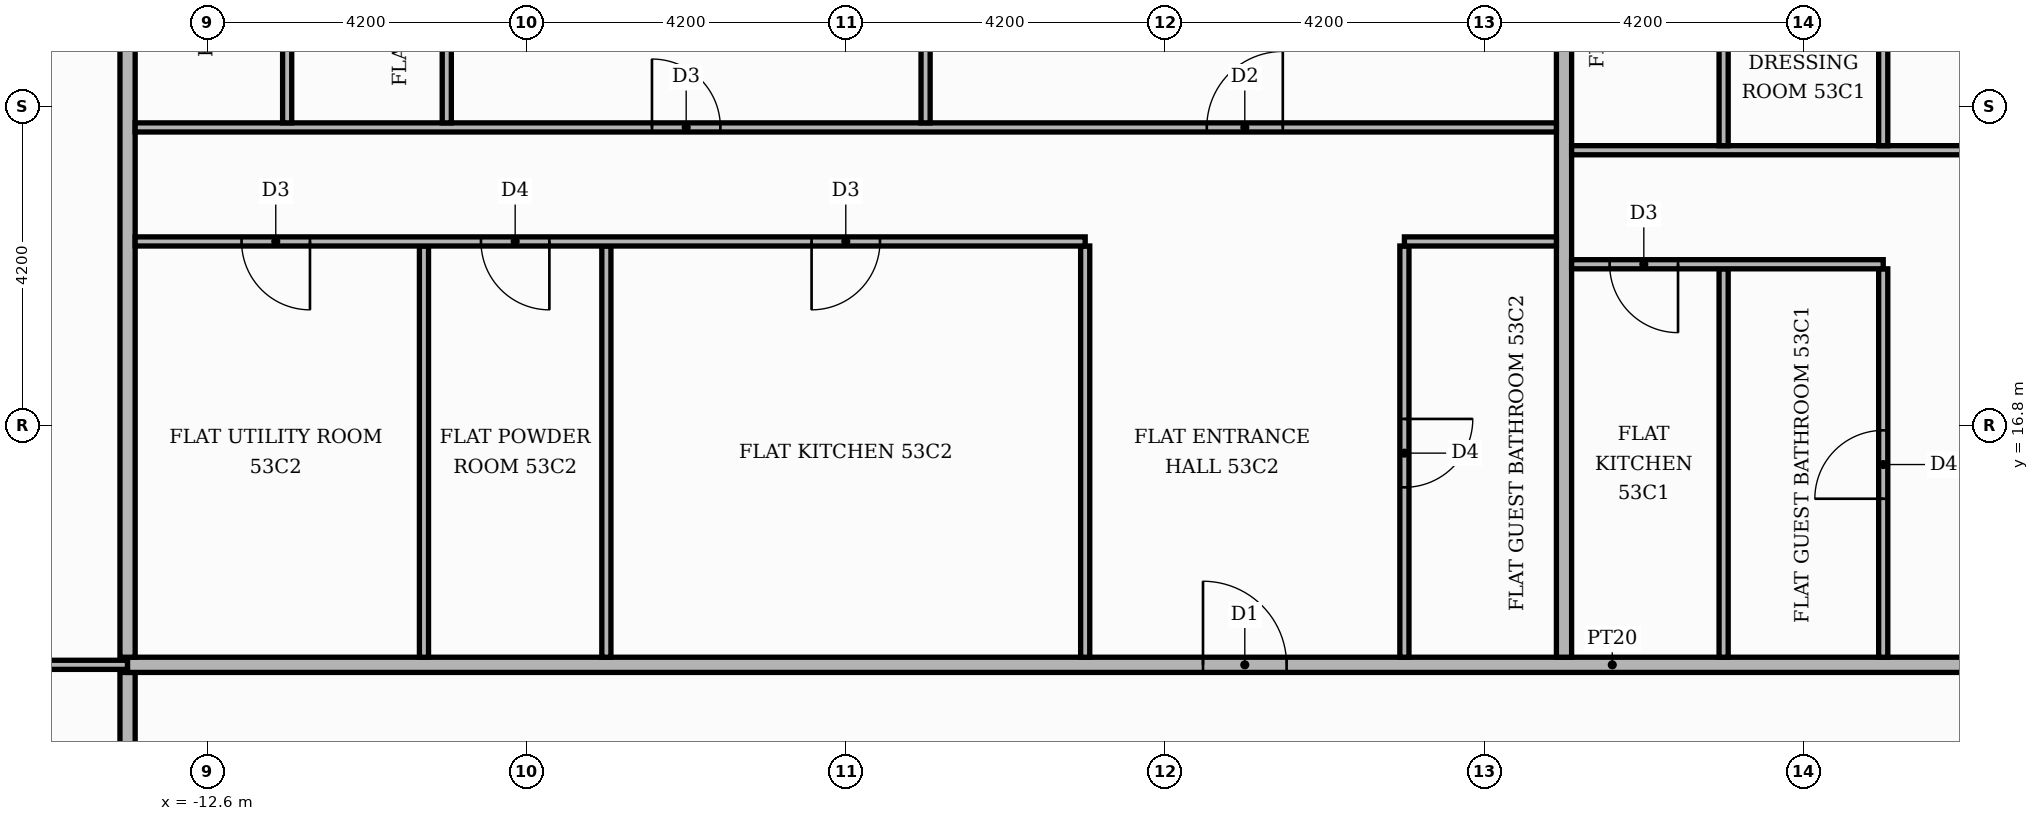
"""IFC4 building model, lengths in metres.
Left out: names, types, materials, properties, quantities, classifications, styles, units other than length and angle.
Written with IfcOpenShell. Run it as: python <this file> out.ifc"""

import sys

from ifc_helpers import new_model, si_unit, direction, frame, frame_2d, origin, place, context, subcontext, project, spatial, rectangle, extrude, element, fill, save


model = new_model("IFC4")
c1 = context("Model", 3, precision=1e-05, world=origin(), true_north=direction((0.0, 1.0)))
c2 = subcontext(c1, "Body", "Model", "MODEL_VIEW")
j1 = project(units=[si_unit("LENGTHUNIT", "METRE"), si_unit("PLANEANGLEUNIT", "RADIAN")], contexts=[c1])
p1 = place(None, origin())
s1 = spatial("IfcSite", under=j1, at=p1, CompositionType="ELEMENT")
p2 = place(p1, origin())
s2 = spatial("IfcBuilding", under=s1, at=p2, CompositionType="ELEMENT")
p3 = place(p2, frame((0.0, 0.0, 223.5)))
s3 = spatial("IfcBuildingStorey", under=s2, at=p3, CompositionType="ELEMENT", Elevation=223.5)
p4 = place(p3, frame((-13.65, -13.55, 0.0), z_axis=(0.0, 0.0, 1.0), x_axis=(0.0, 1.0, 0.0)))
e1 = element("IfcWall", 1, at=p4, inside=s3, PredefinedType="PARTITIONING", context=c2, shape_type="SweptSolid", body=[
    extrude(rectangle(XDim=27.1, YDim=0.2, at=frame_2d((13.55, 0.0))), origin(), (0.0, 0.0, 1.0), 3.48),
])
p5 = place(p4, frame((23.5, 0.0, 0.0)))
e2 = element("IfcOpeningElement", 2, at=p5, cuts=e1, PredefinedType="OPENING", context=c2, shape_type="SweptSolid", body=[
    extrude(rectangle(XDim=1.1, YDim=2.4, at=frame_2d((0.55, 1.2))), frame((0.0, 0.11, 0.0), z_axis=(0.0, -1.0, 0.0), x_axis=(1.0, 0.0, 0.0)), (0.0, 0.0, 1.0), 0.22),
])
p6 = place(p3, frame((-19.82, 13.65, 0.0), z_axis=(0.0, 0.0, 1.0), x_axis=(1.0, 0.0, 0.0)))
e3 = element("IfcWall", 3, at=p6, inside=s3, PredefinedType="PARTITIONING", context=c2, shape_type="SweptSolid", body=[
    extrude(rectangle(XDim=6.17, YDim=0.12, at=frame_2d((3.085, 0.0))), origin(), (0.0, 0.0, 1.0), 3.48),
])
p7 = place(p6, frame((2.635, 0.0, 0.0)))
e4 = element("IfcOpeningElement", 4, at=p7, cuts=e3, PredefinedType="OPENING", context=c2, shape_type="SweptSolid", body=[
    extrude(rectangle(XDim=0.9, YDim=2.1, at=frame_2d((0.45, 1.05))), frame((0.0, 0.07, 0.0), z_axis=(0.0, -1.0, 0.0), x_axis=(1.0, 0.0, 0.0)), (0.0, 0.0, 1.0), 0.14),
])
p8 = place(p3, frame((-13.65, 13.65, 0.0), z_axis=(0.0, 0.0, 1.0), x_axis=(1.0, 0.0, 0.0)))
e5 = element("IfcWall", 5, at=p8, inside=s3, PredefinedType="PARTITIONING", context=c2, shape_type="SweptSolid", body=[
    extrude(rectangle(XDim=39.07, YDim=0.2, at=frame_2d((19.535, 0.0))), origin(), (0.0, 0.0, 1.0), 3.48),
])
p9 = place(p8, frame((24.65, 0.0, 0.0)))
e6 = element("IfcOpeningElement", 6, at=p9, cuts=e5, PredefinedType="OPENING", context=c2, shape_type="SweptSolid", body=[
    extrude(rectangle(XDim=1.1, YDim=2.4, at=frame_2d((0.55, 1.2))), frame((0.0, 0.11, 0.0), z_axis=(0.0, -1.0, 0.0), x_axis=(1.0, 0.0, 0.0)), (0.0, 0.0, 1.0), 0.22),
])
p10 = place(p8, frame((14.15, 0.0, 0.0)))
e7 = element("IfcOpeningElement", 7, at=p10, cuts=e5, PredefinedType="OPENING", context=c2, shape_type="SweptSolid", body=[
    extrude(rectangle(XDim=1.1, YDim=2.4, at=frame_2d((0.55, 1.2))), frame((0.0, 0.11, 0.0), z_axis=(0.0, -1.0, 0.0), x_axis=(1.0, 0.0, 0.0)), (0.0, 0.0, 1.0), 0.22),
])
p11 = place(p3, frame((-13.65, 13.75, 0.0), z_axis=(0.0, 0.0, 1.0), x_axis=(0.0, 1.0, 0.0)))
e8 = element("IfcWall", 8, at=p11, inside=s3, PredefinedType="PARTITIONING", context=c2, shape_type="SweptSolid", body=[
    extrude(rectangle(XDim=11.67, YDim=0.2, at=frame_2d((5.835, 0.0))), origin(), (0.0, 0.0, 1.0), 3.48),
])
for number, where, z_axis, x_axis in (
    (9, (-9.75, 13.75, 0.0), (0.0, 0.0, 1.0), (0.0, 1.0, 0.0)),
    (10, (-7.35, 13.75, 0.0), (0.0, 0.0, 1.0), (0.0, 1.0, 0.0)),
    (11, (-1.05, 13.75, 0.0), (0.0, 0.0, 1.0), (0.0, 1.0, 0.0)),
):
    element("IfcWall", number, at=place(p3, frame(where, z_axis=z_axis, x_axis=x_axis)), inside=s3, PredefinedType="PARTITIONING", context=c2, shape_type="SweptSolid", body=[
        extrude(rectangle(XDim=5.41, YDim=0.12, at=frame_2d((2.705, 0.0))), origin(), (0.0, 0.0, 1.0), 3.48),
    ])
p12 = place(p3, frame((3.15, 13.75, 0.0), z_axis=(0.0, 0.0, 1.0), x_axis=(0.0, 1.0, 0.0)))
e12 = element("IfcWall", 12, at=p12, inside=s3, PredefinedType="PARTITIONING", context=c2, shape_type="SweptSolid", body=[
    extrude(rectangle(XDim=5.41, YDim=0.12, at=frame_2d((2.705, 0.0))), origin(), (0.0, 0.0, 1.0), 3.48),
])
p13 = place(p12, frame((2.235, 0.0, 0.0)))
e13 = element("IfcOpeningElement", 13, at=p13, cuts=e12, PredefinedType="OPENING", context=c2, shape_type="SweptSolid", body=[
    extrude(rectangle(XDim=0.9, YDim=2.1, at=frame_2d((0.45, 1.05))), frame((0.0, 0.07, 0.0), z_axis=(0.0, -1.0, 0.0), x_axis=(1.0, 0.0, 0.0)), (0.0, 0.0, 1.0), 0.14),
])
p14 = place(p3, frame((5.25, 13.75, 0.0), z_axis=(0.0, 0.0, 1.0), x_axis=(0.0, 1.0, 0.0)))
e14 = element("IfcWall", 14, at=p14, inside=s3, PredefinedType="PARTITIONING", context=c2, shape_type="SweptSolid", body=[
    extrude(rectangle(XDim=11.67, YDim=0.2, at=frame_2d((5.835, 0.0))), origin(), (0.0, 0.0, 1.0), 3.48),
])
p15 = place(p3, frame((7.35, 13.75, 0.0), z_axis=(0.0, 0.0, 1.0), x_axis=(0.0, 1.0, 0.0)))
e15 = element("IfcWall", 15, at=p15, inside=s3, PredefinedType="PARTITIONING", context=c2, shape_type="SweptSolid", body=[
    extrude(rectangle(XDim=5.11, YDim=0.12, at=frame_2d((2.555, 0.0))), origin(), (0.0, 0.0, 1.0), 3.48),
])
p16 = place(p3, frame((9.45, 13.75, 0.0), z_axis=(0.0, 0.0, 1.0), x_axis=(0.0, 1.0, 0.0)))
e16 = element("IfcWall", 16, at=p16, inside=s3, PredefinedType="PARTITIONING", context=c2, shape_type="SweptSolid", body=[
    extrude(rectangle(XDim=5.11, YDim=0.12, at=frame_2d((2.555, 0.0))), origin(), (0.0, 0.0, 1.0), 3.48),
])
p17 = place(p16, frame((2.085, 0.0, 0.0)))
e17 = element("IfcOpeningElement", 17, at=p17, cuts=e16, PredefinedType="OPENING", context=c2, shape_type="SweptSolid", body=[
    extrude(rectangle(XDim=0.9, YDim=2.1, at=frame_2d((0.45, 1.05))), frame((0.0, 0.07, 0.0), z_axis=(0.0, -1.0, 0.0), x_axis=(1.0, 0.0, 0.0)), (0.0, 0.0, 1.0), 0.14),
])
p18 = place(p3, frame((5.35, 18.92, 0.0), z_axis=(0.0, 0.0, 1.0), x_axis=(1.0, 0.0, 0.0)))
e18 = element("IfcWall", 18, at=p18, inside=s3, PredefinedType="PARTITIONING", context=c2, shape_type="SweptSolid", body=[
    extrude(rectangle(XDim=4.1, YDim=0.12, at=frame_2d((2.05, 0.0))), origin(), (0.0, 0.0, 1.0), 3.48),
])
p19 = place(p18, frame((0.5, 0.0, 0.0)))
e19 = element("IfcOpeningElement", 19, at=p19, cuts=e18, PredefinedType="OPENING", context=c2, shape_type="SweptSolid", body=[
    extrude(rectangle(XDim=0.9, YDim=2.1, at=frame_2d((0.45, 1.05))), frame((0.0, 0.07, 0.0), z_axis=(0.0, -1.0, 0.0), x_axis=(1.0, 0.0, 0.0)), (0.0, 0.0, 1.0), 0.14),
])
p20 = place(p3, frame((-13.55, 19.22, 0.0), z_axis=(0.0, 0.0, 1.0), x_axis=(1.0, 0.0, 0.0)))
e20 = element("IfcWall", 20, at=p20, inside=s3, PredefinedType="PARTITIONING", context=c2, shape_type="SweptSolid", body=[
    extrude(rectangle(XDim=12.5, YDim=0.12, at=frame_2d((6.25, 0.0))), origin(), (0.0, 0.0, 1.0), 3.48),
])
p21 = place(p20, frame((8.9, 0.0, 0.0)))
e21 = element("IfcOpeningElement", 21, at=p21, cuts=e20, PredefinedType="OPENING", context=c2, shape_type="SweptSolid", body=[
    extrude(rectangle(XDim=0.9, YDim=2.1, at=frame_2d((0.45, 1.05))), frame((0.0, 0.07, 0.0), z_axis=(0.0, -1.0, 0.0), x_axis=(1.0, 0.0, 0.0)), (0.0, 0.0, 1.0), 0.14),
])
p22 = place(p20, frame((4.55, 0.0, 0.0)))
e22 = element("IfcOpeningElement", 22, at=p22, cuts=e20, PredefinedType="OPENING", context=c2, shape_type="SweptSolid", body=[
    extrude(rectangle(XDim=0.9, YDim=2.1, at=frame_2d((0.45, 1.05))), frame((0.0, 0.07, 0.0), z_axis=(0.0, -1.0, 0.0), x_axis=(1.0, 0.0, 0.0)), (0.0, 0.0, 1.0), 0.14),
])
p23 = place(p20, frame((1.4, 0.0, 0.0)))
e23 = element("IfcOpeningElement", 23, at=p23, cuts=e20, PredefinedType="OPENING", context=c2, shape_type="SweptSolid", body=[
    extrude(rectangle(XDim=0.9, YDim=2.1, at=frame_2d((0.45, 1.05))), frame((0.0, 0.07, 0.0), z_axis=(0.0, -1.0, 0.0), x_axis=(1.0, 0.0, 0.0)), (0.0, 0.0, 1.0), 0.14),
])
p24 = place(p3, frame((3.15, 19.22, 0.0), z_axis=(0.0, 0.0, 1.0), x_axis=(1.0, 0.0, 0.0)))
e24 = element("IfcWall", 24, at=p24, inside=s3, PredefinedType="PARTITIONING", context=c2, shape_type="SweptSolid", body=[
    extrude(rectangle(XDim=2.0, YDim=0.12, at=frame_2d((1.0, 0.0))), origin(), (0.0, 0.0, 1.0), 3.48),
])
p25 = place(p3, frame((5.35, 20.42, 0.0), z_axis=(0.0, 0.0, 1.0), x_axis=(1.0, 0.0, 0.0)))
e25 = element("IfcWall", 25, at=p25, inside=s3, PredefinedType="PARTITIONING", context=c2, shape_type="SweptSolid", body=[
    extrude(rectangle(XDim=15.869, YDim=0.12, at=frame_2d((7.935, 0.0))), origin(), (0.0, 0.0, 1.0), 3.48),
])
p26 = place(p25, frame((8.85, 0.0, 0.0)))
e26 = element("IfcOpeningElement", 26, at=p26, cuts=e25, PredefinedType="OPENING", context=c2, shape_type="SweptSolid", body=[
    extrude(rectangle(XDim=1.0, YDim=2.1, at=frame_2d((0.5, 1.05))), frame((0.0, 0.07, 0.0), z_axis=(0.0, -1.0, 0.0), x_axis=(1.0, 0.0, 0.0)), (0.0, 0.0, 1.0), 0.14),
])
p27 = place(p25, frame((5.75, 0.0, 0.0)))
e27 = element("IfcOpeningElement", 27, at=p27, cuts=e25, PredefinedType="OPENING", context=c2, shape_type="SweptSolid", body=[
    extrude(rectangle(XDim=0.9, YDim=2.1, at=frame_2d((0.45, 1.05))), frame((0.0, 0.07, 0.0), z_axis=(0.0, -1.0, 0.0), x_axis=(1.0, 0.0, 0.0)), (0.0, 0.0, 1.0), 0.14),
])
p28 = place(p3, frame((7.35, 20.48, 0.0), z_axis=(0.0, 0.0, 1.0), x_axis=(0.0, 1.0, 0.0)))
e28 = element("IfcWall", 28, at=p28, inside=s3, PredefinedType="PARTITIONING", context=c2, shape_type="SweptSolid", body=[
    extrude(rectangle(XDim=4.94, YDim=0.12, at=frame_2d((2.47, 0.0))), origin(), (0.0, 0.0, 1.0), 3.48),
])
p29 = place(p28, frame((2.14, 0.0, 0.0)))
e29 = element("IfcOpeningElement", 29, at=p29, cuts=e28, PredefinedType="OPENING", context=c2, shape_type="SweptSolid", body=[
    extrude(rectangle(XDim=0.9, YDim=2.1, at=frame_2d((0.45, 1.05))), frame((0.0, 0.07, 0.0), z_axis=(0.0, -1.0, 0.0), x_axis=(1.0, 0.0, 0.0)), (0.0, 0.0, 1.0), 0.14),
])
p30 = place(p3, frame((9.45, 20.48, 0.0), z_axis=(0.0, 0.0, 1.0), x_axis=(0.0, 1.0, 0.0)))
e30 = element("IfcWall", 30, at=p30, inside=s3, PredefinedType="PARTITIONING", context=c2, shape_type="SweptSolid", body=[
    extrude(rectangle(XDim=4.94, YDim=0.12, at=frame_2d((2.47, 0.0))), origin(), (0.0, 0.0, 1.0), 3.48),
])
p31 = place(p30, frame((2.14, 0.0, 0.0)))
e31 = element("IfcOpeningElement", 31, at=p31, cuts=e30, PredefinedType="OPENING", context=c2, shape_type="SweptSolid", body=[
    extrude(rectangle(XDim=0.9, YDim=2.1, at=frame_2d((0.45, 1.05))), frame((0.0, 0.07, 0.0), z_axis=(0.0, -1.0, 0.0), x_axis=(1.0, 0.0, 0.0)), (0.0, 0.0, 1.0), 0.14),
])
p32 = place(p3, frame((-13.55, 20.72, 0.0), z_axis=(0.0, 0.0, 1.0), x_axis=(1.0, 0.0, 0.0)))
e32 = element("IfcWall", 32, at=p32, inside=s3, PredefinedType="PARTITIONING", context=c2, shape_type="SweptSolid", body=[
    extrude(rectangle(XDim=18.7, YDim=0.12, at=frame_2d((9.35, 0.0))), origin(), (0.0, 0.0, 1.0), 3.48),
])
p33 = place(p32, frame((14.1, 0.0, 0.0)))
e33 = element("IfcOpeningElement", 33, at=p33, cuts=e32, PredefinedType="OPENING", context=c2, shape_type="SweptSolid", body=[
    extrude(rectangle(XDim=1.0, YDim=2.1, at=frame_2d((0.5, 1.05))), frame((0.0, 0.07, 0.0), z_axis=(0.0, -1.0, 0.0), x_axis=(1.0, 0.0, 0.0)), (0.0, 0.0, 1.0), 0.14),
])
p34 = place(p32, frame((6.8, 0.0, 0.0)))
e34 = element("IfcOpeningElement", 34, at=p34, cuts=e32, PredefinedType="OPENING", context=c2, shape_type="SweptSolid", body=[
    extrude(rectangle(XDim=0.9, YDim=2.1, at=frame_2d((0.45, 1.05))), frame((0.0, 0.07, 0.0), z_axis=(0.0, -1.0, 0.0), x_axis=(1.0, 0.0, 0.0)), (0.0, 0.0, 1.0), 0.14),
])
p35 = place(p3, frame((-11.55, 20.78, 0.0), z_axis=(0.0, 0.0, 1.0), x_axis=(0.0, 1.0, 0.0)))
e35 = element("IfcWall", 35, at=p35, inside=s3, PredefinedType="PARTITIONING", context=c2, shape_type="SweptSolid", body=[
    extrude(rectangle(XDim=4.64, YDim=0.12, at=frame_2d((2.32, 0.0))), origin(), (0.0, 0.0, 1.0), 3.48),
])
p36 = place(p35, frame((1.99, 0.0, 0.0)))
e36 = element("IfcOpeningElement", 36, at=p36, cuts=e35, PredefinedType="OPENING", context=c2, shape_type="SweptSolid", body=[
    extrude(rectangle(XDim=0.9, YDim=2.1, at=frame_2d((0.45, 1.05))), frame((0.0, 0.07, 0.0), z_axis=(0.0, -1.0, 0.0), x_axis=(1.0, 0.0, 0.0)), (0.0, 0.0, 1.0), 0.14),
])
p37 = place(p3, frame((-9.45, 20.78, 0.0), z_axis=(0.0, 0.0, 1.0), x_axis=(0.0, 1.0, 0.0)))
e37 = element("IfcWall", 37, at=p37, inside=s3, PredefinedType="PARTITIONING", context=c2, shape_type="SweptSolid", body=[
    extrude(rectangle(XDim=4.64, YDim=0.12, at=frame_2d((2.32, 0.0))), origin(), (0.0, 0.0, 1.0), 3.48),
])
p38 = place(p37, frame((1.99, 0.0, 0.0)))
e38 = element("IfcOpeningElement", 38, at=p38, cuts=e37, PredefinedType="OPENING", context=c2, shape_type="SweptSolid", body=[
    extrude(rectangle(XDim=0.9, YDim=2.1, at=frame_2d((0.45, 1.05))), frame((0.0, 0.07, 0.0), z_axis=(0.0, -1.0, 0.0), x_axis=(1.0, 0.0, 0.0)), (0.0, 0.0, 1.0), 0.14),
])
p39 = place(p3, frame((-3.15, 20.78, 0.0), z_axis=(0.0, 0.0, 1.0), x_axis=(0.0, 1.0, 0.0)))
e39 = element("IfcWall", 39, at=p39, inside=s3, PredefinedType="PARTITIONING", context=c2, shape_type="SweptSolid", body=[
    extrude(rectangle(XDim=4.64, YDim=0.12, at=frame_2d((2.32, 0.0))), origin(), (0.0, 0.0, 1.0), 3.48),
])
p40 = place(p17, origin())
e40 = element("IfcDoor", 40, at=p40, inside=s3, OperationType="SINGLE_SWING_LEFT", PredefinedType="DOOR", context=c2, shape_type="SweptSolid", body=[
    extrude(rectangle(XDim=0.9, YDim=2.1, at=frame_2d((0.45, 1.05))), frame((0.0, 0.025, 0.0), z_axis=(0.0, -1.0, 0.0), x_axis=(1.0, 0.0, 0.0)), (0.0, 0.0, 1.0), 0.05),
])
fill(e17, e40)
p41 = place(p19, frame((0.9, 0.0, 0.0), z_axis=(0.0, 0.0, 1.0), x_axis=(-1.0, 0.0, 0.0)))
e41 = element("IfcDoor", 41, at=p41, inside=s3, OperationType="SINGLE_SWING_RIGHT", PredefinedType="DOOR", context=c2, shape_type="SweptSolid", body=[
    extrude(rectangle(XDim=0.9, YDim=2.1, at=frame_2d((0.45, 1.05))), frame((0.0, 0.025, 0.0), z_axis=(0.0, -1.0, 0.0), x_axis=(1.0, 0.0, 0.0)), (0.0, 0.0, 1.0), 0.05),
])
fill(e19, e41)
p42 = place(p10, origin())
e42 = element("IfcDoor", 42, at=p42, inside=s3, OperationType="SINGLE_SWING_LEFT", PredefinedType="DOOR", context=c2, shape_type="SweptSolid", body=[
    extrude(rectangle(XDim=1.1, YDim=2.4, at=frame_2d((0.55, 1.2))), frame((0.0, 0.025, 0.0), z_axis=(0.0, -1.0, 0.0), x_axis=(1.0, 0.0, 0.0)), (0.0, 0.0, 1.0), 0.05),
])
fill(e7, e42)
p43 = place(p13, frame((0.9, 0.0, 0.0), z_axis=(0.0, 0.0, 1.0), x_axis=(-1.0, 0.0, 0.0)))
e43 = element("IfcDoor", 43, at=p43, inside=s3, OperationType="SINGLE_SWING_RIGHT", PredefinedType="DOOR", context=c2, shape_type="SweptSolid", body=[
    extrude(rectangle(XDim=0.9, YDim=2.1, at=frame_2d((0.45, 1.05))), frame((0.0, 0.025, 0.0), z_axis=(0.0, -1.0, 0.0), x_axis=(1.0, 0.0, 0.0)), (0.0, 0.0, 1.0), 0.05),
])
fill(e13, e43)
p44 = place(p21, frame((0.9, 0.0, 0.0), z_axis=(0.0, 0.0, 1.0), x_axis=(-1.0, 0.0, 0.0)))
e44 = element("IfcDoor", 44, at=p44, inside=s3, OperationType="SINGLE_SWING_LEFT", PredefinedType="DOOR", context=c2, shape_type="SweptSolid", body=[
    extrude(rectangle(XDim=0.9, YDim=2.1, at=frame_2d((0.45, 1.05))), frame((0.0, 0.025, 0.0), z_axis=(0.0, -1.0, 0.0), x_axis=(1.0, 0.0, 0.0)), (0.0, 0.0, 1.0), 0.05),
])
fill(e21, e44)
p45 = place(p22, frame((0.9, 0.0, 0.0), z_axis=(0.0, 0.0, 1.0), x_axis=(-1.0, 0.0, 0.0)))
e45 = element("IfcDoor", 45, at=p45, inside=s3, OperationType="SINGLE_SWING_RIGHT", PredefinedType="DOOR", context=c2, shape_type="SweptSolid", body=[
    extrude(rectangle(XDim=0.9, YDim=2.1, at=frame_2d((0.45, 1.05))), frame((0.0, 0.025, 0.0), z_axis=(0.0, -1.0, 0.0), x_axis=(1.0, 0.0, 0.0)), (0.0, 0.0, 1.0), 0.05),
])
fill(e22, e45)
p46 = place(p23, frame((0.9, 0.0, 0.0), z_axis=(0.0, 0.0, 1.0), x_axis=(-1.0, 0.0, 0.0)))
e46 = element("IfcDoor", 46, at=p46, inside=s3, OperationType="SINGLE_SWING_RIGHT", PredefinedType="DOOR", context=c2, shape_type="SweptSolid", body=[
    extrude(rectangle(XDim=0.9, YDim=2.1, at=frame_2d((0.45, 1.05))), frame((0.0, 0.025, 0.0), z_axis=(0.0, -1.0, 0.0), x_axis=(1.0, 0.0, 0.0)), (0.0, 0.0, 1.0), 0.05),
])
fill(e23, e46)
p47 = place(p33, origin())
e47 = element("IfcDoor", 47, at=p47, inside=s3, OperationType="SINGLE_SWING_RIGHT", PredefinedType="DOOR", context=c2, shape_type="SweptSolid", body=[
    extrude(rectangle(XDim=1.0, YDim=2.1, at=frame_2d((0.5, 1.05))), frame((0.0, 0.025, 0.0), z_axis=(0.0, -1.0, 0.0), x_axis=(1.0, 0.0, 0.0)), (0.0, 0.0, 1.0), 0.05),
])
fill(e33, e47)
p48 = place(p34, origin())
e48 = element("IfcDoor", 48, at=p48, inside=s3, OperationType="SINGLE_SWING_LEFT", PredefinedType="DOOR", context=c2, shape_type="SweptSolid", body=[
    extrude(rectangle(XDim=0.9, YDim=2.1, at=frame_2d((0.45, 1.05))), frame((0.0, 0.025, 0.0), z_axis=(0.0, -1.0, 0.0), x_axis=(1.0, 0.0, 0.0)), (0.0, 0.0, 1.0), 0.05),
])
fill(e34, e48)
save(model, sys.argv[1])
